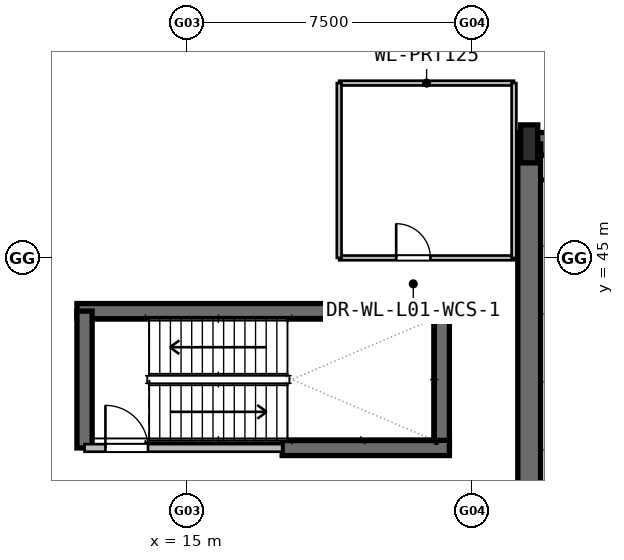
"""IFC4 building model, lengths in metres.
Left out: names, types, materials, properties, quantities, classifications, styles, units other than length and angle.
Written with IfcOpenShell. Run it as: python <this file> out.ifc"""

import sys

from ifc_helpers import new_model, si_unit, direction, frame, frame_2d, origin, origin_2d, place, context, subcontext, project, spatial, rectangle, i_section, extrude, element, fill, save


model = new_model("IFC4")
c1 = context("Model", 3, precision=1e-05, world=origin(), true_north=direction((0.0, 1.0)))
c2 = subcontext(c1, "Body", "Model", "MODEL_VIEW")
j1 = project(units=[si_unit("LENGTHUNIT", "METRE"), si_unit("PLANEANGLEUNIT", "RADIAN")], contexts=[c1])
p1 = place(None, origin())
s1 = spatial("IfcSite", under=j1, at=p1, CompositionType="ELEMENT")
p2 = place(p1, origin())
s2 = spatial("IfcBuilding", under=s1, at=p2, CompositionType="ELEMENT")
p3 = place(p2, frame((0.0, 0.0, 6.0)))
s3 = spatial("IfcBuildingStorey", under=s2, at=p3, CompositionType="ELEMENT", Elevation=6.0)
p4 = place(p3, frame((23.7, 48.0, 0.0), z_axis=(0.0, 0.0, 1.0), x_axis=(1.0, 0.0, 0.0)))
e1 = element("IfcWall", 1, at=p4, inside=s3, PredefinedType="SHEAR", context=c2, shape_type="SweptSolid", body=[
    extrude(rectangle(XDim=27.6, YDim=0.6, at=frame_2d((13.8, 0.0))), origin(), (0.0, 0.0, 1.0), 4.8),
])
p5 = place(p3, frame((24.0, 37.68, 0.0), z_axis=(0.0, 0.0, 1.0), x_axis=(0.0, 1.0, 0.0)))
e2 = element("IfcWall", 2, at=p5, inside=s3, PredefinedType="SHEAR", context=c2, shape_type="SweptSolid", body=[
    extrude(rectangle(XDim=10.32, YDim=0.6, at=frame_2d((5.16, 0.0))), origin(), (0.0, 0.0, 1.0), 4.8),
])
p6 = place(p3, frame((24.0, 48.0, 0.0), z_axis=(0.0, 0.0, 1.0), x_axis=(1.0, 0.0, 0.0)))
e3 = element("IfcColumn", 3, at=p6, inside=s3, PredefinedType="COLUMN", context=c2, shape_type="SweptSolid", body=[
    extrude(i_section(OverallWidth=0.45, OverallDepth=1.0, WebThickness=0.022, FlangeThickness=0.04, at=origin_2d()), origin(), (0.0, 0.0, 1.0), 4.8),
])
p7 = place(p3, frame((12.1, 43.6, 0.0), z_axis=(0.0, 0.0, 1.0), x_axis=(1.0, 0.0, 0.0)))
e4 = element("IfcWall", 4, at=p7, inside=s3, PredefinedType="SHEAR", context=c2, shape_type="SweptSolid", body=[
    extrude(rectangle(XDim=9.8, YDim=0.4, at=frame_2d((4.9, 0.0))), origin(), (0.0, 0.0, 1.0), 4.8),
])
for number, where, z_axis, x_axis in (
    (5, (12.3, 40.0, 0.0), (0.0, 0.0, 1.0), (0.0, 1.0, 0.0)),
    (6, (21.7, 40.0, 0.0), (0.0, 0.0, 1.0), (0.0, 1.0, 0.0)),
):
    element("IfcWall", number, at=place(p3, frame(where, z_axis=z_axis, x_axis=x_axis)), inside=s3, PredefinedType="SHEAR", context=c2, shape_type="SweptSolid", body=[
        extrude(rectangle(XDim=3.6, YDim=0.4, at=frame_2d((1.8, 0.0))), origin(), (0.0, 0.0, 1.0), 4.8),
    ])
p8 = place(p3, frame((17.5, 40.0, 0.0), z_axis=(0.0, 0.0, 1.0), x_axis=(1.0, 0.0, 0.0)))
e7 = element("IfcWall", 7, at=p8, inside=s3, PredefinedType="SHEAR", context=c2, shape_type="SweptSolid", body=[
    extrude(rectangle(XDim=4.4, YDim=0.4, at=frame_2d((2.2, 0.0))), origin(), (0.0, 0.0, 1.0), 4.8),
])
p9 = place(p3, frame((12.3, 40.0, 0.0), z_axis=(0.0, 0.0, 1.0), x_axis=(1.0, 0.0, 0.0)))
e8 = element("IfcWall", 8, at=p9, inside=s3, PredefinedType="PARTITIONING", context=c2, shape_type="SweptSolid", body=[
    extrude(rectangle(XDim=5.2, YDim=0.2, at=frame_2d((2.6, 0.0))), origin(), (0.0, 0.0, 1.0), 4.48),
])
p10 = place(p9, frame((0.55, 0.0, 0.0)))
e9 = element("IfcOpeningElement", 9, at=p10, cuts=e8, PredefinedType="OPENING", context=c2, shape_type="SweptSolid", body=[
    extrude(rectangle(XDim=1.12, YDim=2.1, at=frame_2d((0.56, 1.05))), frame((0.0, 0.11, 0.0), z_axis=(0.0, -1.0, 0.0), x_axis=(1.0, 0.0, 0.0)), (0.0, 0.0, 1.0), 0.22),
])
p11 = place(p3, frame((19.0, 45.0, 0.0), z_axis=(0.0, 0.0, 1.0), x_axis=(1.0, 0.0, 0.0)))
e10 = element("IfcWall", 10, at=p11, inside=s3, PredefinedType="PARTITIONING", context=c2, shape_type="SweptSolid", body=[
    extrude(rectangle(XDim=4.6, YDim=0.125, at=frame_2d((2.3, 0.0))), origin(), (0.0, 0.0, 1.0), 4.48),
])
p12 = place(p11, frame((1.5, 0.0, 0.0)))
e11 = element("IfcOpeningElement", 11, at=p12, cuts=e10, PredefinedType="OPENING", context=c2, shape_type="SweptSolid", body=[
    extrude(rectangle(XDim=0.9, YDim=2.05, at=frame_2d((0.45, 1.025))), frame((0.0, 0.073, 0.0), z_axis=(0.0, -1.0, 0.0), x_axis=(1.0, 0.0, 0.0)), (0.0, 0.0, 1.0), 0.145),
])
for number, where, z_axis, x_axis in (
    (12, (19.0, 49.6, 0.0), (0.0, 0.0, 1.0), (1.0, 0.0, 0.0)),
    (13, (19.0, 45.0, 0.0), (0.0, 0.0, 1.0), (0.0, 1.0, 0.0)),
    (14, (23.6, 45.0, 0.0), (0.0, 0.0, 1.0), (0.0, 1.0, 0.0)),
):
    element("IfcWall", number, at=place(p3, frame(where, z_axis=z_axis, x_axis=x_axis)), inside=s3, PredefinedType="PARTITIONING", context=c2, shape_type="SweptSolid", body=[
        extrude(rectangle(XDim=4.6, YDim=0.125, at=frame_2d((2.3, 0.0))), origin(), (0.0, 0.0, 1.0), 4.48),
    ])
p13 = place(p10, origin())
e15 = element("IfcDoor", 15, at=p13, inside=s3, OperationType="SINGLE_SWING_RIGHT", PredefinedType="DOOR", context=c2, shape_type="SweptSolid", body=[
    extrude(rectangle(XDim=1.12, YDim=2.1, at=frame_2d((0.56, 1.05))), frame((0.0, 0.025, 0.0), z_axis=(0.0, -1.0, 0.0), x_axis=(1.0, 0.0, 0.0)), (0.0, 0.0, 1.0), 0.05),
])
fill(e9, e15)
p14 = place(p12, origin())
e16 = element("IfcDoor", 16, at=p14, inside=s3, OperationType="SINGLE_SWING_RIGHT", PredefinedType="DOOR", context=c2, shape_type="SweptSolid", body=[
    extrude(rectangle(XDim=0.9, YDim=2.05, at=frame_2d((0.45, 1.025))), frame((0.0, 0.025, 0.0), z_axis=(0.0, -1.0, 0.0), x_axis=(1.0, 0.0, 0.0)), (0.0, 0.0, 1.0), 0.05),
])
fill(e11, e16)
save(model, sys.argv[1])
